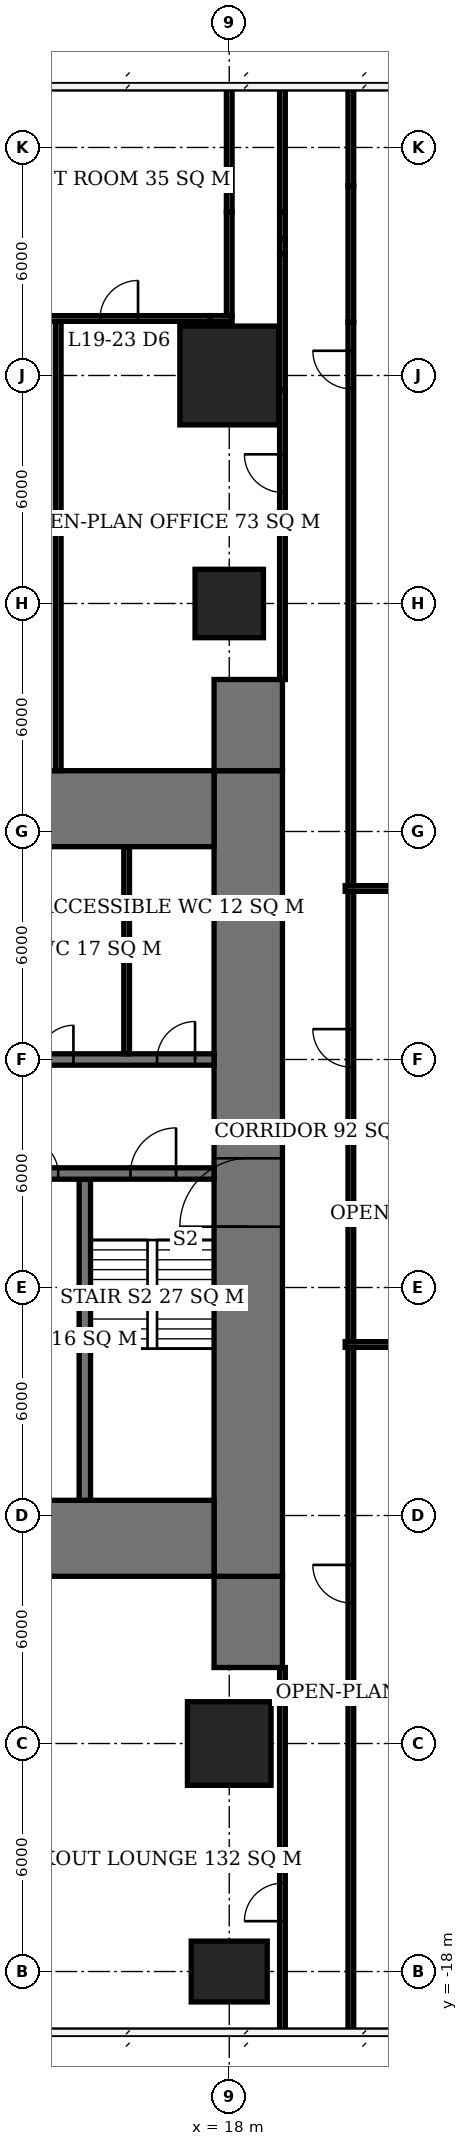
"""IFC4 building model, lengths in metres.
Left out: names, types, materials, properties, quantities, classifications, styles, units other than length and angle.
Written with IfcOpenShell. Run it as: python <this file> out.ifc"""

import sys

from ifc_helpers import new_model, si_unit, direction, frame, frame_2d, origin, origin_2d, place, context, subcontext, project, spatial, rectangle, extrude, element, fill, save


model = new_model("IFC4")
c1 = context("Model", 3, precision=1e-05, world=origin(), true_north=direction((0.0, 1.0)))
c2 = subcontext(c1, "Body", "Model", "MODEL_VIEW")
j1 = project(units=[si_unit("LENGTHUNIT", "METRE"), si_unit("PLANEANGLEUNIT", "RADIAN")], contexts=[c1])
p1 = place(None, origin())
s1 = spatial("IfcSite", under=j1, at=p1, CompositionType="ELEMENT")
p2 = place(p1, origin())
s2 = spatial("IfcBuilding", under=s1, at=p2, CompositionType="ELEMENT")
p3 = place(p2, frame((0.0, 0.0, 80.6)))
s3 = spatial("IfcBuildingStorey", under=s2, at=p3, CompositionType="ELEMENT", Elevation=80.6)
p4 = place(p3, frame((18.0, -18.0, 0.0), z_axis=(0.0, 0.0, 1.0), x_axis=(1.0, 0.0, 0.0)))
e1 = element("IfcColumn", 1, at=p4, inside=s3, PredefinedType="COLUMN", context=c2, shape_type="SweptSolid", body=[
    extrude(rectangle(XDim=2.0, YDim=1.6, at=origin_2d()), origin(), (0.0, 0.0, 1.0), 3.9),
])
p5 = place(p3, frame((18.0, -12.0, 0.0), z_axis=(0.0, 0.0, 1.0), x_axis=(1.0, 0.0, 0.0)))
e2 = element("IfcColumn", 2, at=p5, inside=s3, PredefinedType="COLUMN", context=c2, shape_type="SweptSolid", body=[
    extrude(rectangle(XDim=2.2, YDim=2.2, at=origin_2d()), origin(), (0.0, 0.0, 1.0), 3.9),
])
p6 = place(p3, frame((18.0, 18.0, 0.0), z_axis=(0.0, 0.0, 1.0), x_axis=(1.0, 0.0, 0.0)))
e3 = element("IfcColumn", 3, at=p6, inside=s3, PredefinedType="COLUMN", context=c2, shape_type="SweptSolid", body=[
    extrude(rectangle(XDim=1.8, YDim=1.8, at=origin_2d()), origin(), (0.0, 0.0, 1.0), 3.9),
])
p7 = place(p3, frame((18.0, 24.0, 0.0), z_axis=(0.0, 0.0, 1.0), x_axis=(1.0, 0.0, 0.0)))
e4 = element("IfcColumn", 4, at=p7, inside=s3, PredefinedType="COLUMN", context=c2, shape_type="SweptSolid", body=[
    extrude(rectangle(XDim=2.6, YDim=2.6, at=origin_2d()), origin(), (0.0, 0.0, 1.0), 3.9),
])
for number, where, z_axis, x_axis in (
    (5, (-5.6, -6.6, 0.0), (0.0, 0.0, 1.0), (1.0, 0.0, 0.0)),
    (6, (-5.6, 12.6, 0.0), (0.0, 0.0, 1.0), (1.0, 0.0, 0.0)),
):
    element("IfcWall", number, at=place(p3, frame(where, z_axis=z_axis, x_axis=x_axis)), inside=s3, PredefinedType="SHEAR", context=c2, shape_type="SweptSolid", body=[
        extrude(rectangle(XDim=23.2, YDim=2.0, at=frame_2d((11.6, 0.0))), origin(), (0.0, 0.0, 1.0), 3.9),
    ])
p8 = place(p3, frame((18.5, -7.6, 0.0), z_axis=(0.0, 0.0, 1.0), x_axis=(0.0, 1.0, 0.0)))
e7 = element("IfcWall", 7, at=p8, inside=s3, PredefinedType="SHEAR", context=c2, shape_type="SweptSolid", body=[
    extrude(rectangle(XDim=21.2, YDim=1.8, at=frame_2d((10.6, 0.0))), origin(), (0.0, 0.0, 1.0), 3.9),
])
p9 = place(p8, frame((9.2, 0.0, 0.0)))
e8 = element("IfcOpeningElement", 8, at=p9, cuts=e7, PredefinedType="OPENING", context=c2, shape_type="SweptSolid", body=[
    extrude(rectangle(XDim=1.8, YDim=2.4, at=frame_2d((0.9, 1.2))), frame((0.0, 0.91, 0.0), z_axis=(0.0, -1.0, 0.0), x_axis=(1.0, 0.0, 0.0)), (0.0, 0.0, 1.0), 1.82),
])
for number, where, z_axis, x_axis in (
    (9, (18.5, -10.0, 0.0), (0.0, 0.0, 1.0), (0.0, 1.0, 0.0)),
    (10, (18.5, 13.6, 0.0), (0.0, 0.0, 1.0), (0.0, 1.0, 0.0)),
):
    element("IfcWall", number, at=place(p3, frame(where, z_axis=z_axis, x_axis=x_axis)), inside=s3, PredefinedType="SHEAR", context=c2, shape_type="SweptSolid", body=[
        extrude(rectangle(XDim=2.4, YDim=1.8, at=frame_2d((1.2, 0.0))), origin(), (0.0, 0.0, 1.0), 3.9),
    ])
p10 = place(p3, frame((12.15, 3.0, 0.0), z_axis=(0.0, 0.0, 1.0), x_axis=(1.0, 0.0, 0.0)))
e11 = element("IfcWall", 11, at=p10, inside=s3, PredefinedType="SHEAR", context=c2, shape_type="SweptSolid", body=[
    extrude(rectangle(XDim=5.45, YDim=0.3, at=frame_2d((2.725, 0.0))), origin(), (0.0, 0.0, 1.0), 3.9),
])
p11 = place(p10, frame((3.25, 0.0, 0.0)))
e12 = element("IfcOpeningElement", 12, at=p11, cuts=e11, PredefinedType="OPENING", context=c2, shape_type="SweptSolid", body=[
    extrude(rectangle(XDim=1.2, YDim=2.1, at=frame_2d((0.6, 1.05))), frame((0.0, 0.16, 0.0), z_axis=(0.0, -1.0, 0.0), x_axis=(1.0, 0.0, 0.0)), (0.0, 0.0, 1.0), 0.32),
])
p12 = place(p10, frame((0.45, 0.0, 0.0)))
e13 = element("IfcOpeningElement", 13, at=p12, cuts=e11, PredefinedType="OPENING", context=c2, shape_type="SweptSolid", body=[
    extrude(rectangle(XDim=0.9, YDim=2.1, at=frame_2d((0.45, 1.05))), frame((0.0, 0.16, 0.0), z_axis=(0.0, -1.0, 0.0), x_axis=(1.0, 0.0, 0.0)), (0.0, 0.0, 1.0), 0.32),
])
p13 = place(p3, frame((-0.15, 6.0, 0.0), z_axis=(0.0, 0.0, 1.0), x_axis=(1.0, 0.0, 0.0)))
e14 = element("IfcWall", 14, at=p13, inside=s3, PredefinedType="SHEAR", context=c2, shape_type="SweptSolid", body=[
    extrude(rectangle(XDim=17.75, YDim=0.3, at=frame_2d((8.875, 0.0))), origin(), (0.0, 0.0, 1.0), 3.9),
])
p14 = place(p13, frame((13.15, 0.0, 0.0)))
e15 = element("IfcOpeningElement", 15, at=p14, cuts=e14, PredefinedType="OPENING", context=c2, shape_type="SweptSolid", body=[
    extrude(rectangle(XDim=0.9, YDim=2.1, at=frame_2d((0.45, 1.05))), frame((0.0, 0.16, 0.0), z_axis=(0.0, -1.0, 0.0), x_axis=(1.0, 0.0, 0.0)), (0.0, 0.0, 1.0), 0.32),
])
p15 = place(p13, frame((16.25, 0.0, 0.0)))
e16 = element("IfcOpeningElement", 16, at=p15, cuts=e14, PredefinedType="OPENING", context=c2, shape_type="SweptSolid", body=[
    extrude(rectangle(XDim=1.0, YDim=2.1, at=frame_2d((0.5, 1.05))), frame((0.0, 0.16, 0.0), z_axis=(0.0, -1.0, 0.0), x_axis=(1.0, 0.0, 0.0)), (0.0, 0.0, 1.0), 0.32),
])
p16 = place(p13, frame((1.1, 0.0, 0.0)))
e17 = element("IfcOpeningElement", 17, at=p16, cuts=e14, PredefinedType="OPENING", context=c2, shape_type="SweptSolid", body=[
    extrude(rectangle(XDim=1.1, YDim=2.1, at=frame_2d((0.55, 1.05))), frame((0.0, 0.16, 0.0), z_axis=(0.0, -1.0, 0.0), x_axis=(1.0, 0.0, 0.0)), (0.0, 0.0, 1.0), 0.32),
])
p17 = place(p13, frame((4.1, 0.0, 0.0)))
e18 = element("IfcOpeningElement", 18, at=p17, cuts=e14, PredefinedType="OPENING", context=c2, shape_type="SweptSolid", body=[
    extrude(rectangle(XDim=1.1, YDim=2.1, at=frame_2d((0.55, 1.05))), frame((0.0, 0.16, 0.0), z_axis=(0.0, -1.0, 0.0), x_axis=(1.0, 0.0, 0.0)), (0.0, 0.0, 1.0), 0.32),
])
p18 = place(p13, frame((7.1, 0.0, 0.0)))
e19 = element("IfcOpeningElement", 19, at=p18, cuts=e14, PredefinedType="OPENING", context=c2, shape_type="SweptSolid", body=[
    extrude(rectangle(XDim=1.1, YDim=2.1, at=frame_2d((0.55, 1.05))), frame((0.0, 0.16, 0.0), z_axis=(0.0, -1.0, 0.0), x_axis=(1.0, 0.0, 0.0)), (0.0, 0.0, 1.0), 0.32),
])
p19 = place(p13, frame((10.1, 0.0, 0.0)))
e20 = element("IfcOpeningElement", 20, at=p19, cuts=e14, PredefinedType="OPENING", context=c2, shape_type="SweptSolid", body=[
    extrude(rectangle(XDim=1.1, YDim=2.1, at=frame_2d((0.55, 1.05))), frame((0.0, 0.16, 0.0), z_axis=(0.0, -1.0, 0.0), x_axis=(1.0, 0.0, 0.0)), (0.0, 0.0, 1.0), 0.32),
])
p20 = place(p3, frame((14.2, -5.6, 0.0), z_axis=(0.0, 0.0, 1.0), x_axis=(0.0, 1.0, 0.0)))
e21 = element("IfcWall", 21, at=p20, inside=s3, PredefinedType="SHEAR", context=c2, shape_type="SweptSolid", body=[
    extrude(rectangle(XDim=8.45, YDim=0.3, at=frame_2d((4.225, 0.0))), origin(), (0.0, 0.0, 1.0), 3.9),
])
p21 = place(p3, frame((15.3, 6.15, 0.0), z_axis=(0.0, 0.0, 1.0), x_axis=(0.0, 1.0, 0.0)))
e22 = element("IfcWall", 22, at=p21, inside=s3, PredefinedType="PLUMBINGWALL", context=c2, shape_type="SweptSolid", body=[
    extrude(rectangle(XDim=5.45, YDim=0.15, at=frame_2d((2.725, 0.0))), origin(), (0.0, 0.0, 1.0), 3.65),
])
p22 = place(p3, frame((12.71, 25.5, 0.0), z_axis=(0.0, 0.0, 1.0), x_axis=(1.0, 0.0, 0.0)))
e23 = element("IfcWall", 23, at=p22, inside=s3, PredefinedType="PARTITIONING", context=c2, shape_type="SweptSolid", body=[
    extrude(rectangle(XDim=4.78, YDim=0.15, at=frame_2d((2.39, 0.0))), origin(), (0.0, 0.0, 1.0), 3.65),
])
p23 = place(p22, frame((1.89, 0.0, 0.0)))
e24 = element("IfcOpeningElement", 24, at=p23, cuts=e23, PredefinedType="OPENING", context=c2, shape_type="SweptSolid", body=[
    extrude(rectangle(XDim=1.0, YDim=2.1, at=frame_2d((0.5, 1.05))), frame((0.0, 0.085, 0.0), z_axis=(0.0, -1.0, 0.0), x_axis=(1.0, 0.0, 0.0)), (0.0, 0.0, 1.0), 0.17),
])
p24 = place(p3, frame((17.49, 25.5, 0.0), z_axis=(0.0, 0.0, 1.0), x_axis=(1.0, 0.0, 0.0)))
e25 = element("IfcWall", 25, at=p24, inside=s3, PredefinedType="PARTITIONING", context=c2, shape_type="SweptSolid", body=[
    extrude(rectangle(XDim=0.585, YDim=0.15, at=frame_2d((0.292, 0.0))), origin(), (0.0, 0.0, 1.0), 2.65),
])
p25 = place(p3, frame((18.0, 25.575, 0.0), z_axis=(0.0, 0.0, 1.0), x_axis=(0.0, 1.0, 0.0)))
e26 = element("IfcWall", 26, at=p25, inside=s3, PredefinedType="PARTITIONING", context=c2, shape_type="SweptSolid", body=[
    extrude(rectangle(XDim=2.735, YDim=0.15, at=frame_2d((1.368, 0.0))), origin(), (0.0, 0.0, 1.0), 2.65),
])
p26 = place(p3, frame((18.0, 28.31, 0.0), z_axis=(0.0, 0.0, 1.0), x_axis=(0.0, 1.0, 0.0)))
e27 = element("IfcWall", 27, at=p26, inside=s3, PredefinedType="PARTITIONING", context=c2, shape_type="SweptSolid", body=[
    extrude(rectangle(XDim=3.29, YDim=0.15, at=frame_2d((1.645, 0.0))), origin(), (0.0, 0.0, 1.0), 3.65),
])
p27 = place(p3, frame((13.5, 13.6, 0.0), z_axis=(0.0, 0.0, 1.0), x_axis=(0.0, 1.0, 0.0)))
e28 = element("IfcWall", 28, at=p27, inside=s3, PredefinedType="PARTITIONING", context=c2, shape_type="SweptSolid", body=[
    extrude(rectangle(XDim=11.825, YDim=0.15, at=frame_2d((5.913, 0.0))), origin(), (0.0, 0.0, 1.0), 3.65),
])
p28 = place(p3, frame((19.4, -19.6, 0.0), z_axis=(0.0, 0.0, 1.0), x_axis=(0.0, 1.0, 0.0)))
e29 = element("IfcWall", 29, at=p28, inside=s3, PredefinedType="PARTITIONING", context=c2, shape_type="SweptSolid", body=[
    extrude(rectangle(XDim=9.6, YDim=0.15, at=frame_2d((4.8, 0.0))), origin(), (0.0, 0.0, 1.0), 3.65),
])
p29 = place(p28, frame((2.925, 0.0, 0.0)))
e30 = element("IfcOpeningElement", 30, at=p29, cuts=e29, PredefinedType="OPENING", context=c2, shape_type="SweptSolid", body=[
    extrude(rectangle(XDim=1.0, YDim=2.1, at=frame_2d((0.5, 1.05))), frame((0.0, 0.085, 0.0), z_axis=(0.0, -1.0, 0.0), x_axis=(1.0, 0.0, 0.0)), (0.0, 0.0, 1.0), 0.17),
])
p30 = place(p3, frame((19.4, 16.0, 0.0), z_axis=(0.0, 0.0, 1.0), x_axis=(0.0, 1.0, 0.0)))
e31 = element("IfcWall", 31, at=p30, inside=s3, PredefinedType="PARTITIONING", context=c2, shape_type="SweptSolid", body=[
    extrude(rectangle(XDim=7.608, YDim=0.15, at=frame_2d((3.804, 0.0))), origin(), (0.0, 0.0, 1.0), 3.65),
])
p31 = place(p30, frame((4.925, 0.0, 0.0)))
e32 = element("IfcOpeningElement", 32, at=p31, cuts=e31, PredefinedType="OPENING", context=c2, shape_type="SweptSolid", body=[
    extrude(rectangle(XDim=1.0, YDim=2.1, at=frame_2d((0.5, 1.05))), frame((0.0, 0.085, 0.0), z_axis=(0.0, -1.0, 0.0), x_axis=(1.0, 0.0, 0.0)), (0.0, 0.0, 1.0), 0.17),
])
p32 = place(p3, frame((19.4, 23.608, 0.0), z_axis=(0.0, 0.0, 1.0), x_axis=(0.0, 1.0, 0.0)))
e33 = element("IfcWall", 33, at=p32, inside=s3, PredefinedType="PARTITIONING", context=c2, shape_type="SweptSolid", body=[
    extrude(rectangle(XDim=3.584, YDim=0.15, at=frame_2d((1.792, 0.0))), origin(), (0.0, 0.0, 1.0), 2.65),
])
p33 = place(p3, frame((19.4, 27.192, 0.0), z_axis=(0.0, 0.0, 1.0), x_axis=(0.0, 1.0, 0.0)))
e34 = element("IfcWall", 34, at=p33, inside=s3, PredefinedType="PARTITIONING", context=c2, shape_type="SweptSolid", body=[
    extrude(rectangle(XDim=0.398, YDim=0.15, at=frame_2d((0.199, 0.0))), origin(), (0.0, 0.0, 1.0), 3.65),
])
p34 = place(p3, frame((19.4, 27.59, 0.0), z_axis=(0.0, 0.0, 1.0), x_axis=(0.0, 1.0, 0.0)))
e35 = element("IfcWall", 35, at=p34, inside=s3, PredefinedType="PARTITIONING", context=c2, shape_type="SweptSolid", body=[
    extrude(rectangle(XDim=0.72, YDim=0.15, at=frame_2d((0.36, 0.0))), origin(), (0.0, 0.0, 1.0), 2.65),
])
p35 = place(p3, frame((19.4, 28.31, 0.0), z_axis=(0.0, 0.0, 1.0), x_axis=(0.0, 1.0, 0.0)))
e36 = element("IfcWall", 36, at=p35, inside=s3, PredefinedType="PARTITIONING", context=c2, shape_type="SweptSolid", body=[
    extrude(rectangle(XDim=3.29, YDim=0.15, at=frame_2d((1.645, 0.0))), origin(), (0.0, 0.0, 1.0), 3.65),
])
p36 = place(p3, frame((21.2, -19.6, 0.0), z_axis=(0.0, 0.0, 1.0), x_axis=(0.0, 1.0, 0.0)))
e37 = element("IfcWall", 37, at=p36, inside=s3, PredefinedType="PARTITIONING", context=c2, shape_type="SweptSolid", body=[
    extrude(rectangle(XDim=18.025, YDim=0.15, at=frame_2d((9.013, 0.0))), origin(), (0.0, 0.0, 1.0), 3.65),
])
p37 = place(p36, frame((11.3, 0.0, 0.0)))
e38 = element("IfcOpeningElement", 38, at=p37, cuts=e37, PredefinedType="OPENING", context=c2, shape_type="SweptSolid", body=[
    extrude(rectangle(XDim=1.0, YDim=2.1, at=frame_2d((0.5, 1.05))), frame((0.0, 0.085, 0.0), z_axis=(0.0, -1.0, 0.0), x_axis=(1.0, 0.0, 0.0)), (0.0, 0.0, 1.0), 0.17),
])
p38 = place(p3, frame((21.2, -1.425, 0.0), z_axis=(0.0, 0.0, 1.0), x_axis=(0.0, 1.0, 0.0)))
e39 = element("IfcWall", 39, at=p38, inside=s3, PredefinedType="PARTITIONING", context=c2, shape_type="SweptSolid", body=[
    extrude(rectangle(XDim=11.85, YDim=0.15, at=frame_2d((5.925, 0.0))), origin(), (0.0, 0.0, 1.0), 3.65),
])
p39 = place(p38, frame((7.225, 0.0, 0.0)))
e40 = element("IfcOpeningElement", 40, at=p39, cuts=e39, PredefinedType="OPENING", context=c2, shape_type="SweptSolid", body=[
    extrude(rectangle(XDim=1.0, YDim=2.1, at=frame_2d((0.5, 1.05))), frame((0.0, 0.085, 0.0), z_axis=(0.0, -1.0, 0.0), x_axis=(1.0, 0.0, 0.0)), (0.0, 0.0, 1.0), 0.17),
])
p40 = place(p3, frame((21.05, -1.5, 0.0), z_axis=(0.0, 0.0, 1.0), x_axis=(1.0, 0.0, 0.0)))
e41 = element("IfcWall", 41, at=p40, inside=s3, PredefinedType="PARTITIONING", context=c2, shape_type="SweptSolid", body=[
    extrude(rectangle(XDim=2.875, YDim=0.15, at=frame_2d((1.438, 0.0))), origin(), (0.0, 0.0, 1.0), 3.65),
])
p41 = place(p3, frame((21.2, 10.575, 0.0), z_axis=(0.0, 0.0, 1.0), x_axis=(0.0, 1.0, 0.0)))
e42 = element("IfcWall", 42, at=p41, inside=s3, PredefinedType="PARTITIONING", context=c2, shape_type="SweptSolid", body=[
    extrude(rectangle(XDim=14.833, YDim=0.15, at=frame_2d((7.417, 0.0))), origin(), (0.0, 0.0, 1.0), 3.65),
])
p42 = place(p41, frame((13.075, 0.0, 0.0)))
e43 = element("IfcOpeningElement", 43, at=p42, cuts=e42, PredefinedType="OPENING", context=c2, shape_type="SweptSolid", body=[
    extrude(rectangle(XDim=1.0, YDim=2.1, at=frame_2d((0.5, 1.05))), frame((0.0, 0.085, 0.0), z_axis=(0.0, -1.0, 0.0), x_axis=(1.0, 0.0, 0.0)), (0.0, 0.0, 1.0), 0.17),
])
p43 = place(p3, frame((21.2, 25.408, 0.0), z_axis=(0.0, 0.0, 1.0), x_axis=(0.0, 1.0, 0.0)))
e44 = element("IfcWall", 44, at=p43, inside=s3, PredefinedType="PARTITIONING", context=c2, shape_type="SweptSolid", body=[
    extrude(rectangle(XDim=3.584, YDim=0.15, at=frame_2d((1.792, 0.0))), origin(), (0.0, 0.0, 1.0), 2.65),
])
p44 = place(p3, frame((21.2, 28.992, 0.0), z_axis=(0.0, 0.0, 1.0), x_axis=(0.0, 1.0, 0.0)))
e45 = element("IfcWall", 45, at=p44, inside=s3, PredefinedType="PARTITIONING", context=c2, shape_type="SweptSolid", body=[
    extrude(rectangle(XDim=2.608, YDim=0.15, at=frame_2d((1.304, 0.0))), origin(), (0.0, 0.0, 1.0), 3.65),
])
p45 = place(p3, frame((21.05, 10.5, 0.0), z_axis=(0.0, 0.0, 1.0), x_axis=(1.0, 0.0, 0.0)))
e46 = element("IfcWall", 46, at=p45, inside=s3, PredefinedType="PARTITIONING", context=c2, shape_type="SweptSolid", body=[
    extrude(rectangle(XDim=6.54, YDim=0.15, at=frame_2d((3.27, 0.0))), origin(), (0.0, 0.0, 1.0), 3.65),
])
p46 = place(p9, origin())
e47 = element("IfcDoor", 47, at=p46, inside=s3, OperationType="DOUBLE_DOOR_SINGLE_SWING", PredefinedType="DOOR", context=c2, shape_type="SweptSolid", body=[
    extrude(rectangle(XDim=1.8, YDim=2.4, at=frame_2d((0.9, 1.2))), frame((0.0, 0.025, 0.0), z_axis=(0.0, -1.0, 0.0), x_axis=(1.0, 0.0, 0.0)), (0.0, 0.0, 1.0), 0.05),
])
fill(e8, e47)
p47 = place(p11, origin())
e48 = element("IfcDoor", 48, at=p47, inside=s3, OperationType="SINGLE_SWING_RIGHT", PredefinedType="DOOR", context=c2, shape_type="SweptSolid", body=[
    extrude(rectangle(XDim=1.2, YDim=2.1, at=frame_2d((0.6, 1.05))), frame((0.0, 0.025, 0.0), z_axis=(0.0, -1.0, 0.0), x_axis=(1.0, 0.0, 0.0)), (0.0, 0.0, 1.0), 0.05),
])
fill(e12, e48)
p48 = place(p12, origin())
e49 = element("IfcDoor", 49, at=p48, inside=s3, OperationType="SINGLE_SWING_LEFT", PredefinedType="DOOR", context=c2, shape_type="SweptSolid", body=[
    extrude(rectangle(XDim=0.9, YDim=2.1, at=frame_2d((0.45, 1.05))), frame((0.0, 0.025, 0.0), z_axis=(0.0, -1.0, 0.0), x_axis=(1.0, 0.0, 0.0)), (0.0, 0.0, 1.0), 0.05),
])
fill(e13, e49)
p49 = place(p14, origin())
e50 = element("IfcDoor", 50, at=p49, inside=s3, OperationType="SINGLE_SWING_RIGHT", PredefinedType="DOOR", context=c2, shape_type="SweptSolid", body=[
    extrude(rectangle(XDim=0.9, YDim=2.1, at=frame_2d((0.45, 1.05))), frame((0.0, 0.025, 0.0), z_axis=(0.0, -1.0, 0.0), x_axis=(1.0, 0.0, 0.0)), (0.0, 0.0, 1.0), 0.05),
])
fill(e15, e50)
p50 = place(p15, origin())
e51 = element("IfcDoor", 51, at=p50, inside=s3, OperationType="SINGLE_SWING_RIGHT", PredefinedType="DOOR", context=c2, shape_type="SweptSolid", body=[
    extrude(rectangle(XDim=1.0, YDim=2.1, at=frame_2d((0.5, 1.05))), frame((0.0, 0.025, 0.0), z_axis=(0.0, -1.0, 0.0), x_axis=(1.0, 0.0, 0.0)), (0.0, 0.0, 1.0), 0.05),
])
fill(e16, e51)
p51 = place(p23, origin())
e52 = element("IfcDoor", 52, at=p51, inside=s3, OperationType="SINGLE_SWING_RIGHT", PredefinedType="DOOR", context=c2, shape_type="SweptSolid", body=[
    extrude(rectangle(XDim=1.0, YDim=2.1, at=frame_2d((0.5, 1.05))), frame((0.0, 0.025, 0.0), z_axis=(0.0, -1.0, 0.0), x_axis=(1.0, 0.0, 0.0)), (0.0, 0.0, 1.0), 0.05),
])
fill(e24, e52)
p52 = place(p29, origin())
e53 = element("IfcDoor", 53, at=p52, inside=s3, OperationType="SINGLE_SWING_LEFT", PredefinedType="DOOR", context=c2, shape_type="SweptSolid", body=[
    extrude(rectangle(XDim=1.0, YDim=2.1, at=frame_2d((0.5, 1.05))), frame((0.0, 0.025, 0.0), z_axis=(0.0, -1.0, 0.0), x_axis=(1.0, 0.0, 0.0)), (0.0, 0.0, 1.0), 0.05),
])
fill(e30, e53)
p53 = place(p37, origin())
e54 = element("IfcDoor", 54, at=p53, inside=s3, OperationType="SINGLE_SWING_RIGHT", PredefinedType="DOOR", context=c2, shape_type="SweptSolid", body=[
    extrude(rectangle(XDim=1.0, YDim=2.1, at=frame_2d((0.5, 1.05))), frame((0.0, 0.025, 0.0), z_axis=(0.0, -1.0, 0.0), x_axis=(1.0, 0.0, 0.0)), (0.0, 0.0, 1.0), 0.05),
])
fill(e38, e54)
p54 = place(p39, origin())
e55 = element("IfcDoor", 55, at=p54, inside=s3, OperationType="SINGLE_SWING_RIGHT", PredefinedType="DOOR", context=c2, shape_type="SweptSolid", body=[
    extrude(rectangle(XDim=1.0, YDim=2.1, at=frame_2d((0.5, 1.05))), frame((0.0, 0.025, 0.0), z_axis=(0.0, -1.0, 0.0), x_axis=(1.0, 0.0, 0.0)), (0.0, 0.0, 1.0), 0.05),
])
fill(e40, e55)
p55 = place(p31, origin())
e56 = element("IfcDoor", 56, at=p55, inside=s3, OperationType="SINGLE_SWING_RIGHT", PredefinedType="DOOR", context=c2, shape_type="SweptSolid", body=[
    extrude(rectangle(XDim=1.0, YDim=2.1, at=frame_2d((0.5, 1.05))), frame((0.0, 0.025, 0.0), z_axis=(0.0, -1.0, 0.0), x_axis=(1.0, 0.0, 0.0)), (0.0, 0.0, 1.0), 0.05),
])
fill(e32, e56)
p56 = place(p42, origin())
e57 = element("IfcDoor", 57, at=p56, inside=s3, OperationType="SINGLE_SWING_RIGHT", PredefinedType="DOOR", context=c2, shape_type="SweptSolid", body=[
    extrude(rectangle(XDim=1.0, YDim=2.1, at=frame_2d((0.5, 1.05))), frame((0.0, 0.025, 0.0), z_axis=(0.0, -1.0, 0.0), x_axis=(1.0, 0.0, 0.0)), (0.0, 0.0, 1.0), 0.05),
])
fill(e43, e57)
save(model, sys.argv[1])
